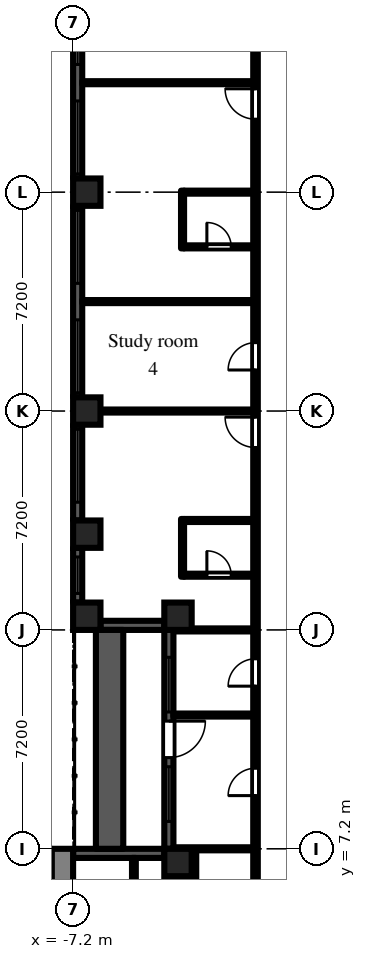
"""IFC4 building model, lengths in metres.
Left out: names, types, materials, properties, quantities, classifications, styles, units other than length and angle.
Written with IfcOpenShell. Run it as: python <this file> out.ifc"""

import sys

from ifc_helpers import new_model, si_unit, direction, frame, frame_2d, origin, origin_2d, place, context, subcontext, project, spatial, rectangle, extrude, element, fill, save


model = new_model("IFC4")
c1 = context("Model", 3, precision=1e-05, world=origin(), true_north=direction((0.0, 1.0)))
c2 = subcontext(c1, "Body", "Model", "MODEL_VIEW")
j1 = project(units=[si_unit("LENGTHUNIT", "METRE"), si_unit("PLANEANGLEUNIT", "RADIAN")], contexts=[c1])
p1 = place(None, origin())
s1 = spatial("IfcSite", under=j1, at=p1, CompositionType="ELEMENT")
p2 = place(p1, origin())
s2 = spatial("IfcBuilding", under=s1, at=p2, CompositionType="ELEMENT")
p3 = place(p2, frame((0.0, 0.0, 59.7)))
s3 = spatial("IfcBuildingStorey", under=s2, at=p3, CompositionType="ELEMENT", Elevation=59.7)
for number, where, z_axis, x_axis in (
    (1, (-6.75, 14.85, 0.0), (0.0, 0.0, 1.0), (1.0, 0.0, 0.0)),
    (2, (-6.75, 17.55, 0.0), (0.0, 0.0, 1.0), (1.0, 0.0, 0.0)),
    (3, (-6.75, 21.6, 0.0), (0.0, 0.0, 1.0), (1.0, 0.0, 0.0)),
    (4, (-6.75, 28.8, 0.0), (0.0, 0.0, 1.0), (1.0, 0.0, 0.0)),
    (5, (-3.75, 6.75, 0.0), (0.0, 0.0, 1.0), (1.0, 0.0, 0.0)),
    (6, (-3.75, 14.85, 0.0), (0.0, 0.0, 1.0), (1.0, 0.0, 0.0)),
):
    element("IfcColumn", number, at=place(p3, frame(where, z_axis=z_axis, x_axis=x_axis)), inside=s3, PredefinedType="COLUMN", context=c2, shape_type="SweptSolid", body=[
        extrude(rectangle(XDim=0.9, YDim=0.9, at=origin_2d()), origin(), (0.0, 0.0, 1.0), 3.0),
    ])
p4 = place(p3, frame((-7.05, 35.55, 0.0), z_axis=(0.0, 0.0, 1.0), x_axis=(0.0, -1.0, 0.0)))
e7 = element("IfcWall", 7, at=p4, inside=s3, PredefinedType="SOLIDWALL", context=c2, shape_type="SweptSolid", body=[
    extrude(rectangle(XDim=6.3, YDim=0.3, at=frame_2d((3.15, 0.0))), origin(), (0.0, 0.0, 1.0), 2.1),
])
p5 = place(p4, frame((0.15, 0.0, 0.2)))
e8 = element("IfcOpeningElement", 8, at=p5, cuts=e7, PredefinedType="OPENING", context=c2, shape_type="SweptSolid", body=[
    extrude(rectangle(XDim=2.4, YDim=1.85, at=frame_2d((1.2, 0.925))), frame((0.0, 0.16, 0.0), z_axis=(0.0, -1.0, 0.0), x_axis=(1.0, 0.0, 0.0)), (0.0, 0.0, 1.0), 0.32),
])
p6 = place(p4, frame((3.75, 0.0, 0.2)))
e9 = element("IfcOpeningElement", 9, at=p6, cuts=e7, PredefinedType="OPENING", context=c2, shape_type="SweptSolid", body=[
    extrude(rectangle(XDim=2.4, YDim=1.85, at=frame_2d((1.2, 0.925))), frame((0.0, 0.16, 0.0), z_axis=(0.0, -1.0, 0.0), x_axis=(1.0, 0.0, 0.0)), (0.0, 0.0, 1.0), 0.32),
])
p7 = place(p3, frame((-7.05, 28.35, 0.0), z_axis=(0.0, 0.0, 1.0), x_axis=(0.0, -1.0, 0.0)))
e10 = element("IfcWall", 10, at=p7, inside=s3, PredefinedType="SOLIDWALL", context=c2, shape_type="SweptSolid", body=[
    extrude(rectangle(XDim=6.3, YDim=0.3, at=frame_2d((3.15, 0.0))), origin(), (0.0, 0.0, 1.0), 2.1),
])
p8 = place(p7, frame((0.15, 0.0, 0.2)))
e11 = element("IfcOpeningElement", 11, at=p8, cuts=e10, PredefinedType="OPENING", context=c2, shape_type="SweptSolid", body=[
    extrude(rectangle(XDim=2.4, YDim=1.85, at=frame_2d((1.2, 0.925))), frame((0.0, 0.16, 0.0), z_axis=(0.0, -1.0, 0.0), x_axis=(1.0, 0.0, 0.0)), (0.0, 0.0, 1.0), 0.32),
])
p9 = place(p7, frame((3.75, 0.0, 0.2)))
e12 = element("IfcOpeningElement", 12, at=p9, cuts=e10, PredefinedType="OPENING", context=c2, shape_type="SweptSolid", body=[
    extrude(rectangle(XDim=2.4, YDim=1.85, at=frame_2d((1.2, 0.925))), frame((0.0, 0.16, 0.0), z_axis=(0.0, -1.0, 0.0), x_axis=(1.0, 0.0, 0.0)), (0.0, 0.0, 1.0), 0.32),
])
p10 = place(p3, frame((-7.05, 21.15, 0.0), z_axis=(0.0, 0.0, 1.0), x_axis=(0.0, -1.0, 0.0)))
e13 = element("IfcWall", 13, at=p10, inside=s3, PredefinedType="SOLIDWALL", context=c2, shape_type="SweptSolid", body=[
    extrude(rectangle(XDim=3.15, YDim=0.3, at=frame_2d((1.575, 0.0))), origin(), (0.0, 0.0, 1.0), 2.1),
])
p11 = place(p10, frame((0.15, 0.0, 0.2)))
e14 = element("IfcOpeningElement", 14, at=p11, cuts=e13, PredefinedType="OPENING", context=c2, shape_type="SweptSolid", body=[
    extrude(rectangle(XDim=2.4, YDim=1.85, at=frame_2d((1.2, 0.925))), frame((0.0, 0.16, 0.0), z_axis=(0.0, -1.0, 0.0), x_axis=(1.0, 0.0, 0.0)), (0.0, 0.0, 1.0), 0.32),
])
p12 = place(p3, frame((-7.05, 17.1, 0.0), z_axis=(0.0, 0.0, 1.0), x_axis=(0.0, -1.0, 0.0)))
e15 = element("IfcWall", 15, at=p12, inside=s3, PredefinedType="SOLIDWALL", context=c2, shape_type="SweptSolid", body=[
    extrude(rectangle(XDim=1.8, YDim=0.3, at=frame_2d((0.9, 0.0))), origin(), (0.0, 0.0, 1.0), 2.1),
])
p13 = place(p12, frame((0.3, 0.0, 0.2)))
e16 = element("IfcOpeningElement", 16, at=p13, cuts=e15, PredefinedType="OPENING", context=c2, shape_type="SweptSolid", body=[
    extrude(rectangle(XDim=1.2, YDim=1.85, at=frame_2d((0.6, 0.925))), frame((0.0, 0.16, 0.0), z_axis=(0.0, -1.0, 0.0), x_axis=(1.0, 0.0, 0.0)), (0.0, 0.0, 1.0), 0.32),
])
p14 = place(p3, frame((-6.3, 14.55, 0.0), z_axis=(0.0, 0.0, 1.0), x_axis=(1.0, 0.0, 0.0)))
e17 = element("IfcWall", 17, at=p14, inside=s3, PredefinedType="SOLIDWALL", context=c2, shape_type="SweptSolid", body=[
    extrude(rectangle(XDim=2.1, YDim=0.3, at=frame_2d((1.05, 0.0))), origin(), (0.0, 0.0, 1.0), 2.55),
])
p15 = place(p3, frame((-4.05, 14.4, 0.0), z_axis=(0.0, 0.0, 1.0), x_axis=(0.0, -1.0, 0.0)))
e18 = element("IfcWall", 18, at=p15, inside=s3, PredefinedType="SOLIDWALL", context=c2, shape_type="SweptSolid", body=[
    extrude(rectangle(XDim=7.2, YDim=0.3, at=frame_2d((3.6, 0.0))), origin(), (0.0, 0.0, 1.0), 2.55),
])
p16 = place(p15, frame((3.0, 0.0, 0.0)))
e19 = element("IfcOpeningElement", 19, at=p16, cuts=e18, PredefinedType="OPENING", context=c2, shape_type="SweptSolid", body=[
    extrude(rectangle(XDim=1.2, YDim=2.05, at=frame_2d((0.6, 1.025))), frame((0.0, 0.16, 0.0), z_axis=(0.0, -1.0, 0.0), x_axis=(1.0, 0.0, 0.0)), (0.0, 0.0, 1.0), 0.32),
])
p17 = place(p15, frame((0.9, 0.0, 0.2)))
e20 = element("IfcOpeningElement", 20, at=p17, cuts=e18, PredefinedType="OPENING", context=c2, shape_type="SweptSolid", body=[
    extrude(rectangle(XDim=1.8, YDim=1.85, at=frame_2d((0.9, 0.925))), frame((0.0, 0.16, 0.0), z_axis=(0.0, -1.0, 0.0), x_axis=(1.0, 0.0, 0.0)), (0.0, 0.0, 1.0), 0.32),
])
p18 = place(p15, frame((4.5, 0.0, 0.2)))
e21 = element("IfcOpeningElement", 21, at=p18, cuts=e18, PredefinedType="OPENING", context=c2, shape_type="SweptSolid", body=[
    extrude(rectangle(XDim=1.8, YDim=1.85, at=frame_2d((0.9, 0.925))), frame((0.0, 0.16, 0.0), z_axis=(0.0, -1.0, 0.0), x_axis=(1.0, 0.0, 0.0)), (0.0, 0.0, 1.0), 0.32),
])
p19 = place(p3, frame((-4.2, 7.05, 0.0), z_axis=(0.0, 0.0, 1.0), x_axis=(-1.0, 0.0, 0.0)))
e22 = element("IfcWall", 22, at=p19, inside=s3, PredefinedType="SOLIDWALL", context=c2, shape_type="SweptSolid", body=[
    extrude(rectangle(XDim=3.0, YDim=0.3, at=frame_2d((1.5, 0.0))), origin(), (0.0, 0.0, 1.0), 2.55),
])
p20 = place(p3, frame((-6.0, 7.2, 0.0), z_axis=(0.0, 0.0, 1.0), x_axis=(0.0, 1.0, 0.0)))
e23 = element("IfcWall", 23, at=p20, inside=s3, PredefinedType="PARAPET", context=c2, shape_type="SweptSolid", body=[
    extrude(rectangle(XDim=7.2, YDim=0.9, at=frame_2d((3.6, 0.0))), origin(), (0.0, 0.0, 1.0), 0.8),
])
p21 = place(p3, frame((-7.55, -7.2, 0.0), z_axis=(0.0, 0.0, 1.0), x_axis=(0.0, 1.0, 0.0)))
e24 = element("IfcWall", 24, at=p21, inside=s3, PredefinedType="SHEAR", context=c2, shape_type="SweptSolid", body=[
    extrude(rectangle(XDim=14.4, YDim=0.7, at=frame_2d((7.2, 0.0))), origin(), (0.0, 0.0, 1.0), 2.55),
])
p22 = place(p21, frame((6.0, 0.0, 0.0)))
e25 = element("IfcOpeningElement", 25, at=p22, cuts=e24, PredefinedType="OPENING", context=c2, shape_type="SweptSolid", body=[
    extrude(rectangle(XDim=2.4, YDim=2.2, at=frame_2d((1.2, 1.1))), frame((0.0, 0.36, 0.0), z_axis=(0.0, -1.0, 0.0), x_axis=(1.0, 0.0, 0.0)), (0.0, 0.0, 1.0), 0.72),
])
for number, where, z_axis, x_axis in (
    (26, (-6.9, 21.6, 0.0), (0.0, 0.0, 1.0), (1.0, 0.0, 0.0)),
    (27, (-6.9, 25.2, 0.0), (0.0, 0.0, 1.0), (1.0, 0.0, 0.0)),
    (28, (-6.9, 32.4, 0.0), (0.0, 0.0, 1.0), (1.0, 0.0, 0.0)),
):
    element("IfcWall", number, at=place(p3, frame(where, z_axis=z_axis, x_axis=x_axis)), inside=s3, PredefinedType="PARTITIONING", context=c2, shape_type="SweptSolid", body=[
        extrude(rectangle(XDim=5.625, YDim=0.1, at=frame_2d((2.812, 0.0))), origin(), (0.0, 0.0, 1.0), 2.55),
    ])
p23 = place(p3, frame((-5.2, 1.275, 0.0), z_axis=(0.0, 0.0, 1.0), x_axis=(0.0, 1.0, 0.0)))
e29 = element("IfcWall", 29, at=p23, inside=s3, PredefinedType="PARTITIONING", context=c2, shape_type="SweptSolid", body=[
    extrude(rectangle(XDim=5.625, YDim=0.125, at=frame_2d((2.812, 0.0))), origin(), (0.0, 0.0, 1.0), 2.55),
])
for number, where, z_axis, x_axis in (
    (30, (-3.9, 7.2, 0.0), (0.0, 0.0, 1.0), (1.0, 0.0, 0.0)),
    (31, (-3.9, 11.6, 0.0), (0.0, 0.0, 1.0), (1.0, 0.0, 0.0)),
    (32, (-3.9, 14.4, 0.0), (0.0, 0.0, 1.0), (1.0, 0.0, 0.0)),
):
    element("IfcWall", number, at=place(p3, frame(where, z_axis=z_axis, x_axis=x_axis)), inside=s3, PredefinedType="PARTITIONING", context=c2, shape_type="SweptSolid", body=[
        extrude(rectangle(XDim=2.625, YDim=0.1, at=frame_2d((1.312, 0.0))), origin(), (0.0, 0.0, 1.0), 2.55),
    ])
p24 = place(p3, frame((-3.6, 16.15, 0.0), z_axis=(0.0, 0.0, 1.0), x_axis=(0.0, 1.0, 0.0)))
e33 = element("IfcWall", 33, at=p24, inside=s3, PredefinedType="PARTITIONING", context=c2, shape_type="SweptSolid", body=[
    extrude(rectangle(XDim=1.9, YDim=0.1, at=frame_2d((0.95, 0.0))), origin(), (0.0, 0.0, 1.0), 2.55),
])
p25 = place(p3, frame((-3.55, 16.2, 0.0), z_axis=(0.0, 0.0, 1.0), x_axis=(1.0, 0.0, 0.0)))
e34 = element("IfcWall", 34, at=p25, inside=s3, PredefinedType="PARTITIONING", context=c2, shape_type="SweptSolid", body=[
    extrude(rectangle(XDim=2.275, YDim=0.1, at=frame_2d((1.138, 0.0))), origin(), (0.0, 0.0, 1.0), 2.55),
])
p26 = place(p25, frame((0.75, 0.0, 0.0)))
e35 = element("IfcOpeningElement", 35, at=p26, cuts=e34, PredefinedType="OPENING", context=c2, shape_type="SweptSolid", body=[
    extrude(rectangle(XDim=0.8, YDim=2.1, at=frame_2d((0.4, 1.05))), frame((0.0, 0.06, 0.0), z_axis=(0.0, -1.0, 0.0), x_axis=(1.0, 0.0, 0.0)), (0.0, 0.0, 1.0), 0.12),
])
p27 = place(p3, frame((-3.55, 18.0, 0.0), z_axis=(0.0, 0.0, 1.0), x_axis=(1.0, 0.0, 0.0)))
e36 = element("IfcWall", 36, at=p27, inside=s3, PredefinedType="PARTITIONING", context=c2, shape_type="SweptSolid", body=[
    extrude(rectangle(XDim=2.275, YDim=0.1, at=frame_2d((1.138, 0.0))), origin(), (0.0, 0.0, 1.0), 2.55),
])
p28 = place(p3, frame((-3.6, 26.95, 0.0), z_axis=(0.0, 0.0, 1.0), x_axis=(0.0, 1.0, 0.0)))
e37 = element("IfcWall", 37, at=p28, inside=s3, PredefinedType="PARTITIONING", context=c2, shape_type="SweptSolid", body=[
    extrude(rectangle(XDim=1.9, YDim=0.1, at=frame_2d((0.95, 0.0))), origin(), (0.0, 0.0, 1.0), 2.55),
])
p29 = place(p3, frame((-3.55, 27.0, 0.0), z_axis=(0.0, 0.0, 1.0), x_axis=(1.0, 0.0, 0.0)))
e38 = element("IfcWall", 38, at=p29, inside=s3, PredefinedType="PARTITIONING", context=c2, shape_type="SweptSolid", body=[
    extrude(rectangle(XDim=2.275, YDim=0.1, at=frame_2d((1.138, 0.0))), origin(), (0.0, 0.0, 1.0), 2.55),
])
p30 = place(p29, frame((0.75, 0.0, 0.0)))
e39 = element("IfcOpeningElement", 39, at=p30, cuts=e38, PredefinedType="OPENING", context=c2, shape_type="SweptSolid", body=[
    extrude(rectangle(XDim=0.8, YDim=2.1, at=frame_2d((0.4, 1.05))), frame((0.0, 0.06, 0.0), z_axis=(0.0, -1.0, 0.0), x_axis=(1.0, 0.0, 0.0)), (0.0, 0.0, 1.0), 0.12),
])
p31 = place(p3, frame((-3.55, 28.8, 0.0), z_axis=(0.0, 0.0, 1.0), x_axis=(1.0, 0.0, 0.0)))
e40 = element("IfcWall", 40, at=p31, inside=s3, PredefinedType="PARTITIONING", context=c2, shape_type="SweptSolid", body=[
    extrude(rectangle(XDim=2.275, YDim=0.1, at=frame_2d((1.138, 0.0))), origin(), (0.0, 0.0, 1.0), 2.55),
])
p32 = place(p3, frame((-3.2, 1.275, 0.0), z_axis=(0.0, 0.0, 1.0), x_axis=(0.0, 1.0, 0.0)))
e41 = element("IfcWall", 41, at=p32, inside=s3, PredefinedType="PARTITIONING", context=c2, shape_type="SweptSolid", body=[
    extrude(rectangle(XDim=5.875, YDim=0.1, at=frame_2d((2.938, 0.0))), origin(), (0.0, 0.0, 1.0), 2.55),
])
p33 = place(p3, frame((-1.2, 1.275, 0.0), z_axis=(0.0, 0.0, 1.0), x_axis=(0.0, 1.0, 0.0)))
e42 = element("IfcWall", 42, at=p33, inside=s3, PredefinedType="PARTITIONING", context=c2, shape_type="SweptSolid", body=[
    extrude(rectangle(XDim=35.225, YDim=0.15, at=frame_2d((17.613, 0.0))), origin(), (0.0, 0.0, 1.0), 2.55),
])
p34 = place(p33, frame((2.475, 0.0, 0.0)))
e43 = element("IfcOpeningElement", 43, at=p34, cuts=e42, PredefinedType="OPENING", context=c2, shape_type="SweptSolid", body=[
    extrude(rectangle(XDim=0.9, YDim=2.1, at=frame_2d((0.45, 1.05))), frame((0.0, 0.085, 0.0), z_axis=(0.0, -1.0, 0.0), x_axis=(1.0, 0.0, 0.0)), (0.0, 0.0, 1.0), 0.17),
])
p35 = place(p33, frame((11.275, 0.0, 0.0)))
e44 = element("IfcOpeningElement", 44, at=p35, cuts=e42, PredefinedType="OPENING", context=c2, shape_type="SweptSolid", body=[
    extrude(rectangle(XDim=0.9, YDim=2.1, at=frame_2d((0.45, 1.05))), frame((0.0, 0.085, 0.0), z_axis=(0.0, -1.0, 0.0), x_axis=(1.0, 0.0, 0.0)), (0.0, 0.0, 1.0), 0.17),
])
p36 = place(p33, frame((7.675, 0.0, 0.0)))
e45 = element("IfcOpeningElement", 45, at=p36, cuts=e42, PredefinedType="OPENING", context=c2, shape_type="SweptSolid", body=[
    extrude(rectangle(XDim=0.9, YDim=2.1, at=frame_2d((0.45, 1.05))), frame((0.0, 0.085, 0.0), z_axis=(0.0, -1.0, 0.0), x_axis=(1.0, 0.0, 0.0)), (0.0, 0.0, 1.0), 0.17),
])
p37 = place(p33, frame((19.125, 0.0, 0.0)))
e46 = element("IfcOpeningElement", 46, at=p37, cuts=e42, PredefinedType="OPENING", context=c2, shape_type="SweptSolid", body=[
    extrude(rectangle(XDim=1.0, YDim=2.1, at=frame_2d((0.5, 1.05))), frame((0.0, 0.085, 0.0), z_axis=(0.0, -1.0, 0.0), x_axis=(1.0, 0.0, 0.0)), (0.0, 0.0, 1.0), 0.17),
])
p38 = place(p33, frame((21.675, 0.0, 0.0)))
e47 = element("IfcOpeningElement", 47, at=p38, cuts=e42, PredefinedType="OPENING", context=c2, shape_type="SweptSolid", body=[
    extrude(rectangle(XDim=0.9, YDim=2.1, at=frame_2d((0.45, 1.05))), frame((0.0, 0.085, 0.0), z_axis=(0.0, -1.0, 0.0), x_axis=(1.0, 0.0, 0.0)), (0.0, 0.0, 1.0), 0.17),
])
p39 = place(p33, frame((29.925, 0.0, 0.0)))
e48 = element("IfcOpeningElement", 48, at=p39, cuts=e42, PredefinedType="OPENING", context=c2, shape_type="SweptSolid", body=[
    extrude(rectangle(XDim=1.0, YDim=2.1, at=frame_2d((0.5, 1.05))), frame((0.0, 0.085, 0.0), z_axis=(0.0, -1.0, 0.0), x_axis=(1.0, 0.0, 0.0)), (0.0, 0.0, 1.0), 0.17),
])
p40 = place(p33, frame((32.275, 0.0, 0.0)))
e49 = element("IfcOpeningElement", 49, at=p40, cuts=e42, PredefinedType="OPENING", context=c2, shape_type="SweptSolid", body=[
    extrude(rectangle(XDim=1.8, YDim=2.1, at=frame_2d((0.9, 1.05))), frame((0.0, 0.085, 0.0), z_axis=(0.0, -1.0, 0.0), x_axis=(1.0, 0.0, 0.0)), (0.0, 0.0, 1.0), 0.17),
])
p41 = place(p5, origin())
e50 = element("IfcWindow", 50, at=p41, inside=s3, PartitioningType="SINGLE_PANEL", PredefinedType="WINDOW", context=c2, shape_type="SweptSolid", body=[
    extrude(rectangle(XDim=2.4, YDim=1.85, at=frame_2d((1.2, 0.925))), frame((0.0, 0.03, 0.0), z_axis=(0.0, -1.0, 0.0), x_axis=(1.0, 0.0, 0.0)), (0.0, 0.0, 1.0), 0.06),
])
fill(e8, e50)
p42 = place(p6, origin())
e51 = element("IfcWindow", 51, at=p42, inside=s3, PartitioningType="SINGLE_PANEL", PredefinedType="WINDOW", context=c2, shape_type="SweptSolid", body=[
    extrude(rectangle(XDim=2.4, YDim=1.85, at=frame_2d((1.2, 0.925))), frame((0.0, 0.03, 0.0), z_axis=(0.0, -1.0, 0.0), x_axis=(1.0, 0.0, 0.0)), (0.0, 0.0, 1.0), 0.06),
])
fill(e9, e51)
p43 = place(p8, origin())
e52 = element("IfcWindow", 52, at=p43, inside=s3, PartitioningType="SINGLE_PANEL", PredefinedType="WINDOW", context=c2, shape_type="SweptSolid", body=[
    extrude(rectangle(XDim=2.4, YDim=1.85, at=frame_2d((1.2, 0.925))), frame((0.0, 0.03, 0.0), z_axis=(0.0, -1.0, 0.0), x_axis=(1.0, 0.0, 0.0)), (0.0, 0.0, 1.0), 0.06),
])
fill(e11, e52)
p44 = place(p9, origin())
e53 = element("IfcWindow", 53, at=p44, inside=s3, PartitioningType="SINGLE_PANEL", PredefinedType="WINDOW", context=c2, shape_type="SweptSolid", body=[
    extrude(rectangle(XDim=2.4, YDim=1.85, at=frame_2d((1.2, 0.925))), frame((0.0, 0.03, 0.0), z_axis=(0.0, -1.0, 0.0), x_axis=(1.0, 0.0, 0.0)), (0.0, 0.0, 1.0), 0.06),
])
fill(e12, e53)
p45 = place(p11, origin())
e54 = element("IfcWindow", 54, at=p45, inside=s3, PartitioningType="SINGLE_PANEL", PredefinedType="WINDOW", context=c2, shape_type="SweptSolid", body=[
    extrude(rectangle(XDim=2.4, YDim=1.85, at=frame_2d((1.2, 0.925))), frame((0.0, 0.03, 0.0), z_axis=(0.0, -1.0, 0.0), x_axis=(1.0, 0.0, 0.0)), (0.0, 0.0, 1.0), 0.06),
])
fill(e14, e54)
p46 = place(p13, origin())
e55 = element("IfcWindow", 55, at=p46, inside=s3, PartitioningType="SINGLE_PANEL", PredefinedType="WINDOW", context=c2, shape_type="SweptSolid", body=[
    extrude(rectangle(XDim=1.2, YDim=1.85, at=frame_2d((0.6, 0.925))), frame((0.0, 0.03, 0.0), z_axis=(0.0, -1.0, 0.0), x_axis=(1.0, 0.0, 0.0)), (0.0, 0.0, 1.0), 0.06),
])
fill(e16, e55)
p47 = place(p16, origin())
e56 = element("IfcDoor", 56, at=p47, inside=s3, OperationType="SINGLE_SWING_LEFT", PredefinedType="DOOR", context=c2, shape_type="SweptSolid", body=[
    extrude(rectangle(XDim=1.2, YDim=2.05, at=frame_2d((0.6, 1.025))), frame((0.0, 0.025, 0.0), z_axis=(0.0, -1.0, 0.0), x_axis=(1.0, 0.0, 0.0)), (0.0, 0.0, 1.0), 0.05),
])
fill(e19, e56)
p48 = place(p17, origin())
e57 = element("IfcWindow", 57, at=p48, inside=s3, PartitioningType="SINGLE_PANEL", PredefinedType="WINDOW", context=c2, shape_type="SweptSolid", body=[
    extrude(rectangle(XDim=1.8, YDim=1.85, at=frame_2d((0.9, 0.925))), frame((0.0, 0.03, 0.0), z_axis=(0.0, -1.0, 0.0), x_axis=(1.0, 0.0, 0.0)), (0.0, 0.0, 1.0), 0.06),
])
fill(e20, e57)
p49 = place(p18, origin())
e58 = element("IfcWindow", 58, at=p49, inside=s3, PartitioningType="SINGLE_PANEL", PredefinedType="WINDOW", context=c2, shape_type="SweptSolid", body=[
    extrude(rectangle(XDim=1.8, YDim=1.85, at=frame_2d((0.9, 0.925))), frame((0.0, 0.03, 0.0), z_axis=(0.0, -1.0, 0.0), x_axis=(1.0, 0.0, 0.0)), (0.0, 0.0, 1.0), 0.06),
])
fill(e21, e58)
p50 = place(p35, origin())
e59 = element("IfcDoor", 59, at=p50, inside=s3, OperationType="SINGLE_SWING_LEFT", PredefinedType="DOOR", context=c2, shape_type="SweptSolid", body=[
    extrude(rectangle(XDim=0.9, YDim=2.1, at=frame_2d((0.45, 1.05))), frame((0.0, 0.025, 0.0), z_axis=(0.0, -1.0, 0.0), x_axis=(1.0, 0.0, 0.0)), (0.0, 0.0, 1.0), 0.05),
])
fill(e44, e59)
p51 = place(p36, origin())
e60 = element("IfcDoor", 60, at=p51, inside=s3, OperationType="SINGLE_SWING_LEFT", PredefinedType="DOOR", context=c2, shape_type="SweptSolid", body=[
    extrude(rectangle(XDim=0.9, YDim=2.1, at=frame_2d((0.45, 1.05))), frame((0.0, 0.025, 0.0), z_axis=(0.0, -1.0, 0.0), x_axis=(1.0, 0.0, 0.0)), (0.0, 0.0, 1.0), 0.05),
])
fill(e45, e60)
p52 = place(p26, origin())
e61 = element("IfcDoor", 61, at=p52, inside=s3, OperationType="SINGLE_SWING_LEFT", PredefinedType="DOOR", context=c2, shape_type="SweptSolid", body=[
    extrude(rectangle(XDim=0.8, YDim=2.1, at=frame_2d((0.4, 1.05))), frame((0.0, 0.025, 0.0), z_axis=(0.0, -1.0, 0.0), x_axis=(1.0, 0.0, 0.0)), (0.0, 0.0, 1.0), 0.05),
])
fill(e35, e61)
p53 = place(p37, origin())
e62 = element("IfcDoor", 62, at=p53, inside=s3, OperationType="SINGLE_SWING_RIGHT", PredefinedType="DOOR", context=c2, shape_type="SweptSolid", body=[
    extrude(rectangle(XDim=1.0, YDim=2.1, at=frame_2d((0.5, 1.05))), frame((0.0, 0.025, 0.0), z_axis=(0.0, -1.0, 0.0), x_axis=(1.0, 0.0, 0.0)), (0.0, 0.0, 1.0), 0.05),
])
fill(e46, e62)
p54 = place(p38, origin())
e63 = element("IfcDoor", 63, at=p54, inside=s3, OperationType="SINGLE_SWING_LEFT", PredefinedType="DOOR", context=c2, shape_type="SweptSolid", body=[
    extrude(rectangle(XDim=0.9, YDim=2.1, at=frame_2d((0.45, 1.05))), frame((0.0, 0.025, 0.0), z_axis=(0.0, -1.0, 0.0), x_axis=(1.0, 0.0, 0.0)), (0.0, 0.0, 1.0), 0.05),
])
fill(e47, e63)
p55 = place(p30, origin())
e64 = element("IfcDoor", 64, at=p55, inside=s3, OperationType="SINGLE_SWING_LEFT", PredefinedType="DOOR", context=c2, shape_type="SweptSolid", body=[
    extrude(rectangle(XDim=0.8, YDim=2.1, at=frame_2d((0.4, 1.05))), frame((0.0, 0.025, 0.0), z_axis=(0.0, -1.0, 0.0), x_axis=(1.0, 0.0, 0.0)), (0.0, 0.0, 1.0), 0.05),
])
fill(e39, e64)
p56 = place(p39, origin())
e65 = element("IfcDoor", 65, at=p56, inside=s3, OperationType="SINGLE_SWING_RIGHT", PredefinedType="DOOR", context=c2, shape_type="SweptSolid", body=[
    extrude(rectangle(XDim=1.0, YDim=2.1, at=frame_2d((0.5, 1.05))), frame((0.0, 0.025, 0.0), z_axis=(0.0, -1.0, 0.0), x_axis=(1.0, 0.0, 0.0)), (0.0, 0.0, 1.0), 0.05),
])
fill(e48, e65)
save(model, sys.argv[1])
